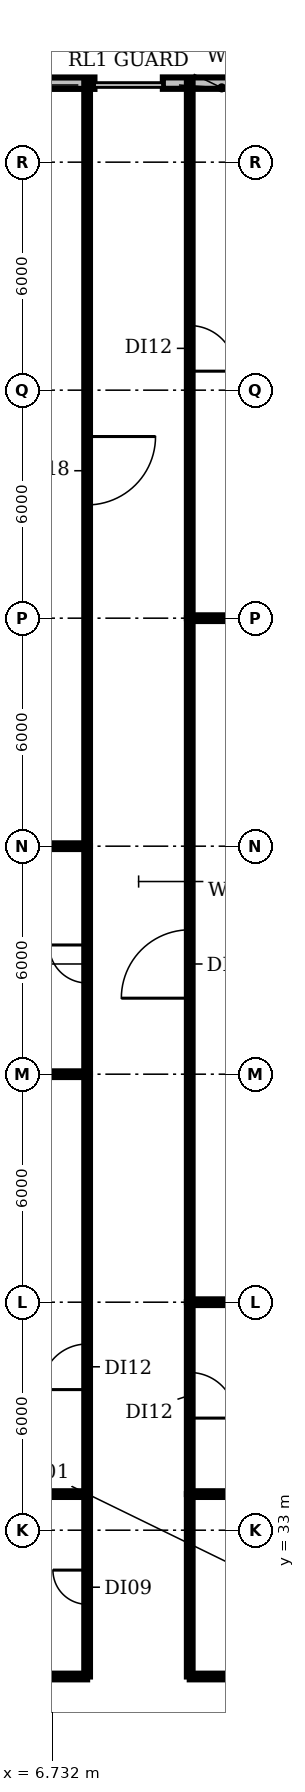
"""IFC4 building model, lengths in metres.
Left out: names, types, materials, properties, quantities, classifications, styles, units other than length and angle.
Written with IfcOpenShell. Run it as: python <this file> out.ifc"""

import sys

from ifc_helpers import new_model, si_unit, direction, frame, frame_2d, origin, place, context, subcontext, project, spatial, rectangle, extrude, element, fill, save


model = new_model("IFC4")
c1 = context("Model", 3, precision=1e-05, world=origin(), true_north=direction((0.0, 1.0)))
c2 = subcontext(c1, "Body", "Model", "MODEL_VIEW")
j1 = project(units=[si_unit("LENGTHUNIT", "METRE"), si_unit("PLANEANGLEUNIT", "RADIAN")], contexts=[c1])
p1 = place(None, origin())
s1 = spatial("IfcSite", under=j1, at=p1, CompositionType="ELEMENT")
p2 = place(p1, origin())
s2 = spatial("IfcBuilding", under=s1, at=p2, CompositionType="ELEMENT")
p3 = place(p2, frame((0.0, 0.0, 205.4)))
s3 = spatial("IfcBuildingStorey", under=s2, at=p3, CompositionType="ELEMENT", Elevation=205.4)
p4 = place(p3, frame((14.357, 71.08, 0.0), z_axis=(0.0, 0.0, 1.0), x_axis=(-1.0, 0.0, 0.0)))
e1 = element("IfcWall", 1, at=p4, inside=s3, PredefinedType="SOLIDWALL", context=c2, shape_type="SweptSolid", body=[
    extrude(rectangle(XDim=4.715, YDim=0.3, at=frame_2d((2.357, 0.0))), origin(), (0.0, 0.0, 1.0), 3.85),
])
p5 = place(p3, frame((7.843, 71.078, 0.0), z_axis=(0.0, 0.0, 1.0), x_axis=(-1.0, 0.0, 0.0)))
e2 = element("IfcWall", 2, at=p5, inside=s3, PredefinedType="SOLIDWALL", context=c2, shape_type="SweptSolid", body=[
    extrude(rectangle(XDim=8.873, YDim=0.3, at=frame_2d((4.436, 0.0))), origin(), (0.0, 0.0, 1.0), 3.85),
])
p6 = place(p3, frame((-2.46, 51.0, 0.0), z_axis=(0.0, 0.0, 1.0), x_axis=(1.0, 0.0, 0.0)))
e3 = element("IfcWall", 3, at=p6, inside=s3, PredefinedType="PARTITIONING", context=c2, shape_type="SweptSolid", body=[
    extrude(rectangle(XDim=10.11, YDim=0.15, at=frame_2d((5.055, 0.0))), origin(), (0.0, 0.0, 1.0), 2.88),
])
p7 = place(p3, frame((-1.88, 45.0, 0.0), z_axis=(0.0, 0.0, 1.0), x_axis=(1.0, 0.0, 0.0)))
e4 = element("IfcWall", 4, at=p7, inside=s3, PredefinedType="PARTITIONING", context=c2, shape_type="SweptSolid", body=[
    extrude(rectangle(XDim=9.53, YDim=0.15, at=frame_2d((4.765, 0.0))), origin(), (0.0, 0.0, 1.0), 2.88),
])
p8 = place(p3, frame((-0.98, 33.95, 0.0), z_axis=(0.0, 0.0, 1.0), x_axis=(1.0, 0.0, 0.0)))
e5 = element("IfcWall", 5, at=p8, inside=s3, PredefinedType="PARTITIONING", context=c2, shape_type="SweptSolid", body=[
    extrude(rectangle(XDim=8.63, YDim=0.15, at=frame_2d((4.315, 0.0))), origin(), (0.0, 0.0, 1.0), 2.88),
])
p9 = place(p3, frame((6.45, 29.15, 0.0), z_axis=(0.0, 0.0, 1.0), x_axis=(1.0, 0.0, 0.0)))
e6 = element("IfcWall", 6, at=p9, inside=s3, PredefinedType="PARTITIONING", context=c2, shape_type="SweptSolid", body=[
    extrude(rectangle(XDim=1.2, YDim=0.15, at=frame_2d((0.6, 0.0))), origin(), (0.0, 0.0, 1.0), 2.88),
])
p10 = place(p3, frame((7.65, 29.15, 0.0), z_axis=(0.0, 0.0, 1.0), x_axis=(0.0, 1.0, 0.0)))
e7 = element("IfcWall", 7, at=p10, inside=s3, PredefinedType="PARTITIONING", context=c2, shape_type="SweptSolid", body=[
    extrude(rectangle(XDim=4.8, YDim=0.15, at=frame_2d((2.4, 0.0))), origin(), (0.0, 0.0, 1.0), 2.88),
])
p11 = place(p10, frame((1.9, 0.0, 0.0)))
e8 = element("IfcOpeningElement", 8, at=p11, cuts=e7, PredefinedType="OPENING", context=c2, shape_type="SweptSolid", body=[
    extrude(rectangle(XDim=0.9, YDim=2.1, at=frame_2d((0.45, 1.05))), frame((0.0, 0.085, 0.0), z_axis=(0.0, -1.0, 0.0), x_axis=(1.0, 0.0, 0.0)), (0.0, 0.0, 1.0), 0.17),
])
p12 = place(p3, frame((7.65, 33.95, 0.0), z_axis=(0.0, 0.0, 1.0), x_axis=(0.0, 1.0, 0.0)))
e9 = element("IfcWall", 9, at=p12, inside=s3, PredefinedType="PARTITIONING", context=c2, shape_type="SweptSolid", body=[
    extrude(rectangle(XDim=11.05, YDim=0.15, at=frame_2d((5.525, 0.0))), origin(), (0.0, 0.0, 1.0), 2.88),
])
p13 = place(p12, frame((2.75, 0.0, 0.0)))
e10 = element("IfcOpeningElement", 10, at=p13, cuts=e9, PredefinedType="OPENING", context=c2, shape_type="SweptSolid", body=[
    extrude(rectangle(XDim=1.2, YDim=2.1, at=frame_2d((0.6, 1.05))), frame((0.0, 0.085, 0.0), z_axis=(0.0, -1.0, 0.0), x_axis=(1.0, 0.0, 0.0)), (0.0, 0.0, 1.0), 0.17),
])
p14 = place(p3, frame((7.65, 45.0, 0.0), z_axis=(0.0, 0.0, 1.0), x_axis=(0.0, 1.0, 0.0)))
e11 = element("IfcWall", 11, at=p14, inside=s3, PredefinedType="PARTITIONING", context=c2, shape_type="SweptSolid", body=[
    extrude(rectangle(XDim=6.0, YDim=0.15, at=frame_2d((3.0, 0.0))), origin(), (0.0, 0.0, 1.0), 2.88),
])
p15 = place(p14, frame((2.4, 0.0, 0.0)))
e12 = element("IfcOpeningElement", 12, at=p15, cuts=e11, PredefinedType="OPENING", context=c2, shape_type="SweptSolid", body=[
    extrude(rectangle(XDim=1.0, YDim=2.1, at=frame_2d((0.5, 1.05))), frame((0.0, 0.085, 0.0), z_axis=(0.0, -1.0, 0.0), x_axis=(1.0, 0.0, 0.0)), (0.0, 0.0, 1.0), 0.17),
])
p16 = place(p3, frame((7.65, 71.09, 0.0), z_axis=(0.0, 0.0, 1.0), x_axis=(0.0, -1.0, 0.0)))
e13 = element("IfcWall", 13, at=p16, inside=s3, PredefinedType="PARTITIONING", context=c2, shape_type="SweptSolid", body=[
    extrude(rectangle(XDim=20.09, YDim=0.15, at=frame_2d((10.045, 0.0))), origin(), (0.0, 0.0, 1.0), 2.88),
])
p17 = place(p16, frame((9.31, 0.0, 0.0)))
e14 = element("IfcOpeningElement", 14, at=p17, cuts=e13, PredefinedType="OPENING", context=c2, shape_type="SweptSolid", body=[
    extrude(rectangle(XDim=1.8, YDim=2.1, at=frame_2d((0.9, 1.05))), frame((0.0, 0.085, 0.0), z_axis=(0.0, -1.0, 0.0), x_axis=(1.0, 0.0, 0.0)), (0.0, 0.0, 1.0), 0.17),
])
p18 = place(p3, frame((10.35, 29.15, 0.0), z_axis=(0.0, 0.0, 1.0), x_axis=(0.0, 1.0, 0.0)))
e15 = element("IfcWall", 15, at=p18, inside=s3, PredefinedType="PARTITIONING", context=c2, shape_type="SweptSolid", body=[
    extrude(rectangle(XDim=4.8, YDim=0.15, at=frame_2d((2.4, 0.0))), origin(), (0.0, 0.0, 1.0), 2.88),
])
p19 = place(p3, frame((10.35, 29.15, 0.0), z_axis=(0.0, 0.0, 1.0), x_axis=(1.0, 0.0, 0.0)))
e16 = element("IfcWall", 16, at=p19, inside=s3, PredefinedType="PARTITIONING", context=c2, shape_type="SweptSolid", body=[
    extrude(rectangle(XDim=1.25, YDim=0.15, at=frame_2d((0.625, 0.0))), origin(), (0.0, 0.0, 1.0), 2.88),
])
p20 = place(p3, frame((10.35, 33.95, 0.0), z_axis=(0.0, 0.0, 1.0), x_axis=(1.0, 0.0, 0.0)))
e17 = element("IfcWall", 17, at=p20, inside=s3, PredefinedType="PARTITIONING", context=c2, shape_type="SweptSolid", body=[
    extrude(rectangle(XDim=12.16, YDim=0.15, at=frame_2d((6.08, 0.0))), origin(), (0.0, 0.0, 1.0), 2.88),
])
p21 = place(p3, frame((10.35, 39.0, 0.0), z_axis=(0.0, 0.0, 1.0), x_axis=(0.0, -1.0, 0.0)))
e18 = element("IfcWall", 18, at=p21, inside=s3, PredefinedType="PARTITIONING", context=c2, shape_type="SweptSolid", body=[
    extrude(rectangle(XDim=5.05, YDim=0.15, at=frame_2d((2.525, 0.0))), origin(), (0.0, 0.0, 1.0), 2.88),
])
p22 = place(p21, frame((1.85, 0.0, 0.0)))
e19 = element("IfcOpeningElement", 19, at=p22, cuts=e18, PredefinedType="OPENING", context=c2, shape_type="SweptSolid", body=[
    extrude(rectangle(XDim=1.2, YDim=2.1, at=frame_2d((0.6, 1.05))), frame((0.0, 0.085, 0.0), z_axis=(0.0, -1.0, 0.0), x_axis=(1.0, 0.0, 0.0)), (0.0, 0.0, 1.0), 0.17),
])
p23 = place(p3, frame((10.35, 39.0, 0.0), z_axis=(0.0, 0.0, 1.0), x_axis=(0.0, 1.0, 0.0)))
e20 = element("IfcWall", 20, at=p23, inside=s3, PredefinedType="PARTITIONING", context=c2, shape_type="SweptSolid", body=[
    extrude(rectangle(XDim=18.0, YDim=0.15, at=frame_2d((9.0, 0.0))), origin(), (0.0, 0.0, 1.0), 2.88),
])
p24 = place(p23, frame((8.0, 0.0, 0.0)))
e21 = element("IfcOpeningElement", 21, at=p24, cuts=e20, PredefinedType="OPENING", context=c2, shape_type="SweptSolid", body=[
    extrude(rectangle(XDim=1.8, YDim=2.1, at=frame_2d((0.9, 1.05))), frame((0.0, 0.085, 0.0), z_axis=(0.0, -1.0, 0.0), x_axis=(1.0, 0.0, 0.0)), (0.0, 0.0, 1.0), 0.17),
])
for number, where, z_axis, x_axis in (
    (22, (10.35, 39.0, 0.0), (0.0, 0.0, 1.0), (1.0, 0.0, 0.0)),
    (23, (10.35, 57.0, 0.0), (0.0, 0.0, 1.0), (1.0, 0.0, 0.0)),
):
    element("IfcWall", number, at=place(p3, frame(where, z_axis=z_axis, x_axis=x_axis)), inside=s3, PredefinedType="PARTITIONING", context=c2, shape_type="SweptSolid", body=[
        extrude(rectangle(XDim=14.63, YDim=0.15, at=frame_2d((7.315, 0.0))), origin(), (0.0, 0.0, 1.0), 2.88),
    ])
p25 = place(p3, frame((10.35, 71.09, 0.0), z_axis=(0.0, 0.0, 1.0), x_axis=(0.0, -1.0, 0.0)))
e24 = element("IfcWall", 24, at=p25, inside=s3, PredefinedType="PARTITIONING", context=c2, shape_type="SweptSolid", body=[
    extrude(rectangle(XDim=14.09, YDim=0.15, at=frame_2d((7.045, 0.0))), origin(), (0.0, 0.0, 1.0), 2.88),
])
p26 = place(p25, frame((6.39, 0.0, 0.0)))
e25 = element("IfcOpeningElement", 25, at=p26, cuts=e24, PredefinedType="OPENING", context=c2, shape_type="SweptSolid", body=[
    extrude(rectangle(XDim=1.2, YDim=2.1, at=frame_2d((0.6, 1.05))), frame((0.0, 0.085, 0.0), z_axis=(0.0, -1.0, 0.0), x_axis=(1.0, 0.0, 0.0)), (0.0, 0.0, 1.0), 0.17),
])
p27 = place(p11, origin())
e26 = element("IfcDoor", 26, at=p27, inside=s3, OperationType="SINGLE_SWING_RIGHT", PredefinedType="DOOR", context=c2, shape_type="SweptSolid", body=[
    extrude(rectangle(XDim=0.9, YDim=2.1, at=frame_2d((0.45, 1.05))), frame((0.0, 0.025, 0.0), z_axis=(0.0, -1.0, 0.0), x_axis=(1.0, 0.0, 0.0)), (0.0, 0.0, 1.0), 0.05),
])
fill(e8, e26)
p28 = place(p13, origin())
e27 = element("IfcDoor", 27, at=p28, inside=s3, OperationType="SINGLE_SWING_LEFT", PredefinedType="DOOR", context=c2, shape_type="SweptSolid", body=[
    extrude(rectangle(XDim=1.2, YDim=2.1, at=frame_2d((0.6, 1.05))), frame((0.0, 0.025, 0.0), z_axis=(0.0, -1.0, 0.0), x_axis=(1.0, 0.0, 0.0)), (0.0, 0.0, 1.0), 0.05),
])
fill(e10, e27)
p29 = place(p15, origin())
e28 = element("IfcDoor", 28, at=p29, inside=s3, OperationType="SINGLE_SWING_RIGHT", PredefinedType="DOOR", context=c2, shape_type="SweptSolid", body=[
    extrude(rectangle(XDim=1.0, YDim=2.1, at=frame_2d((0.5, 1.05))), frame((0.0, 0.025, 0.0), z_axis=(0.0, -1.0, 0.0), x_axis=(1.0, 0.0, 0.0)), (0.0, 0.0, 1.0), 0.05),
])
fill(e12, e28)
p30 = place(p17, origin())
e29 = element("IfcDoor", 29, at=p30, inside=s3, OperationType="SINGLE_SWING_LEFT", PredefinedType="DOOR", context=c2, shape_type="SweptSolid", body=[
    extrude(rectangle(XDim=1.8, YDim=2.1, at=frame_2d((0.9, 1.05))), frame((0.0, 0.025, 0.0), z_axis=(0.0, -1.0, 0.0), x_axis=(1.0, 0.0, 0.0)), (0.0, 0.0, 1.0), 0.05),
])
fill(e14, e29)
p31 = place(p22, origin())
e30 = element("IfcDoor", 30, at=p31, inside=s3, OperationType="SINGLE_SWING_RIGHT", PredefinedType="DOOR", context=c2, shape_type="SweptSolid", body=[
    extrude(rectangle(XDim=1.2, YDim=2.1, at=frame_2d((0.6, 1.05))), frame((0.0, 0.025, 0.0), z_axis=(0.0, -1.0, 0.0), x_axis=(1.0, 0.0, 0.0)), (0.0, 0.0, 1.0), 0.05),
])
fill(e19, e30)
p32 = place(p24, origin())
e31 = element("IfcDoor", 31, at=p32, inside=s3, OperationType="SINGLE_SWING_LEFT", PredefinedType="DOOR", context=c2, shape_type="SweptSolid", body=[
    extrude(rectangle(XDim=1.8, YDim=2.1, at=frame_2d((0.9, 1.05))), frame((0.0, 0.025, 0.0), z_axis=(0.0, -1.0, 0.0), x_axis=(1.0, 0.0, 0.0)), (0.0, 0.0, 1.0), 0.05),
])
fill(e21, e31)
p33 = place(p26, origin())
e32 = element("IfcDoor", 32, at=p33, inside=s3, OperationType="SINGLE_SWING_RIGHT", PredefinedType="DOOR", context=c2, shape_type="SweptSolid", body=[
    extrude(rectangle(XDim=1.2, YDim=2.1, at=frame_2d((0.6, 1.05))), frame((0.0, 0.025, 0.0), z_axis=(0.0, -1.0, 0.0), x_axis=(1.0, 0.0, 0.0)), (0.0, 0.0, 1.0), 0.05),
])
fill(e25, e32)
save(model, sys.argv[1])
